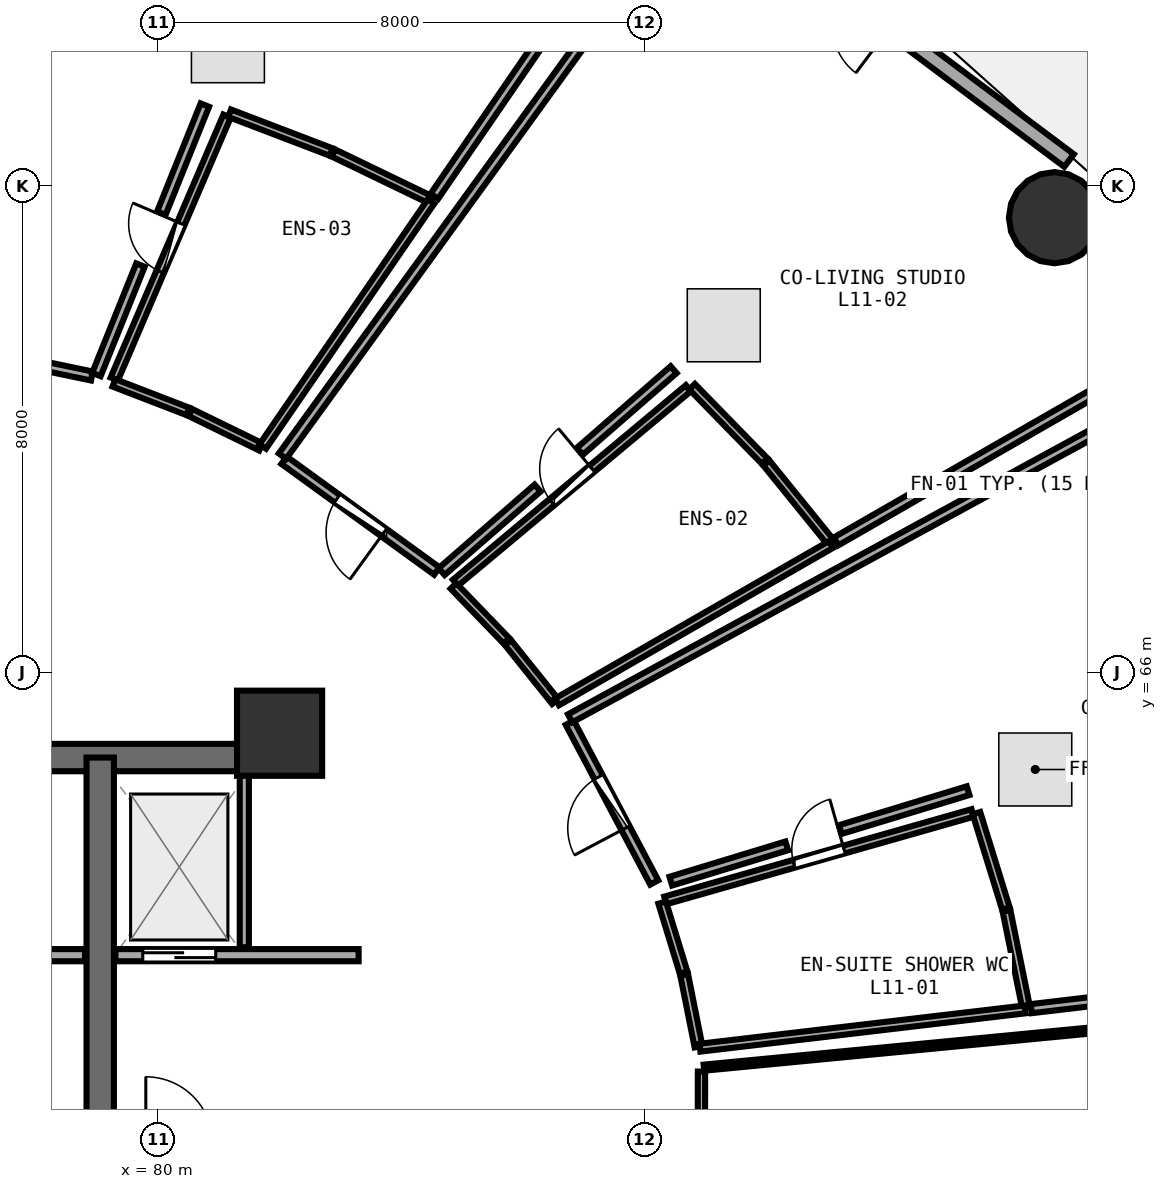
"""IFC4 building model, lengths in metres.
Left out: names, types, materials, properties, quantities, classifications, styles, units other than length and angle.
Written with IfcOpenShell. Run it as: python <this file> out.ifc"""

import sys

from ifc_helpers import new_model, si_unit, direction, frame, frame_2d, origin, origin_2d, place, context, subcontext, project, spatial, rectangle, circle, extrude, element, fill, save


model = new_model("IFC4")
c1 = context("Model", 3, precision=1e-05, world=origin(), true_north=direction((0.0, 1.0)))
c2 = subcontext(c1, "Body", "Model", "MODEL_VIEW")
j1 = project(units=[si_unit("LENGTHUNIT", "METRE"), si_unit("PLANEANGLEUNIT", "RADIAN")], contexts=[c1])
p1 = place(None, origin())
s1 = spatial("IfcSite", under=j1, at=p1, CompositionType="ELEMENT")
p2 = place(p1, origin())
s2 = spatial("IfcBuilding", under=s1, at=p2, CompositionType="ELEMENT")
p3 = place(p2, frame((0.0, 0.0, 45.0)))
s3 = spatial("IfcBuildingStorey", under=s2, at=p3, CompositionType="ELEMENT", Elevation=45.0)
p4 = place(p3, frame((82.0, 65.0, 0.0), z_axis=(0.0, 0.0, 1.0), x_axis=(1.0, 0.0, 0.0)))
e1 = element("IfcColumn", 1, at=p4, inside=s3, PredefinedType="PILASTER", context=c2, shape_type="SweptSolid", body=[
    extrude(rectangle(XDim=1.4, YDim=1.4, at=origin_2d()), origin(), (0.0, 0.0, 1.0), 3.75),
])
p5 = place(p3, frame((94.744, 73.478, 0.0), z_axis=(0.0, 0.0, 1.0), x_axis=(1.0, 0.0, 0.0)))
e2 = element("IfcColumn", 2, at=p5, inside=s3, PredefinedType="COLUMN", context=c2, shape_type="SweptSolid", body=[
    extrude(circle(Radius=0.75, at=origin_2d()), origin(), (0.0, 0.0, 1.0), 3.75),
])
p6 = place(p3, frame((94.984, 74.418, 0.0), z_axis=(0.0, 0.0, 1.0), x_axis=(-0.80030733173, 0.599590005569, 0.0)))
e3 = element("IfcWall", 3, at=p6, inside=s3, PredefinedType="SOLIDWALL", context=c2, shape_type="SweptSolid", body=[
    extrude(rectangle(XDim=8.291, YDim=0.26, at=frame_2d((4.145, 0.0))), origin(), (0.0, 0.0, 1.0), 3.475),
])
p7 = place(p6, frame((3.67, 0.0, 0.0)))
e4 = element("IfcOpeningElement", 4, at=p7, cuts=e3, PredefinedType="OPENING", context=c2, shape_type="SweptSolid", body=[
    extrude(rectangle(XDim=0.95, YDim=2.1, at=frame_2d((0.475, 1.05))), frame((0.0, 0.14, 0.0), z_axis=(0.0, -1.0, 0.0), x_axis=(1.0, 0.0, 0.0)), (0.0, 0.0, 1.0), 0.28),
])
p8 = place(p6, frame((4.97, 0.0, 0.85)))
e5 = element("IfcOpeningElement", 5, at=p8, cuts=e3, PredefinedType="OPENING", context=c2, shape_type="SweptSolid", body=[
    extrude(rectangle(XDim=1.2, YDim=1.45, at=frame_2d((0.6, 0.725))), frame((0.0, 0.14, 0.0), z_axis=(0.0, -1.0, 0.0), x_axis=(1.0, 0.0, 0.0)), (0.0, 0.0, 1.0), 0.28),
])
p9 = place(p3, frame((74.0, 64.6, 0.0), z_axis=(0.0, 0.0, 1.0), x_axis=(1.0, 0.0, 0.0)))
e6 = element("IfcWall", 6, at=p9, inside=s3, PredefinedType="SHEAR", context=c2, shape_type="SweptSolid", body=[
    extrude(rectangle(XDim=8.0, YDim=0.45, at=frame_2d((4.0, 0.0))), origin(), (0.0, 0.0, 1.0), 3.49),
])
p10 = place(p3, frame((79.05, 58.3, 0.0), z_axis=(0.0, 0.0, 1.0), x_axis=(0.0, 1.0, 0.0)))
e7 = element("IfcWall", 7, at=p10, inside=s3, PredefinedType="SHEAR", context=c2, shape_type="SweptSolid", body=[
    extrude(rectangle(XDim=6.3, YDim=0.45, at=frame_2d((3.15, 0.0))), origin(), (0.0, 0.0, 1.0), 3.49),
])
p11 = place(p3, frame((74.2, 61.35, 0.0), z_axis=(0.0, 0.0, 1.0), x_axis=(1.0, 0.0, 0.0)))
e8 = element("IfcWall", 8, at=p11, inside=s3, PredefinedType="SOLIDWALL", context=c2, shape_type="SweptSolid", body=[
    extrude(rectangle(XDim=4.6, YDim=0.2, at=frame_2d((2.3, 0.0))), origin(), (0.0, 0.0, 1.0), 3.48),
])
p12 = place(p11, frame((0.52, 0.0, 0.0)))
e9 = element("IfcOpeningElement", 9, at=p12, cuts=e8, PredefinedType="OPENING", context=c2, shape_type="SweptSolid", body=[
    extrude(rectangle(XDim=1.2, YDim=2.15, at=frame_2d((0.6, 1.075))), frame((0.0, 0.11, 0.0), z_axis=(0.0, -1.0, 0.0), x_axis=(1.0, 0.0, 0.0)), (0.0, 0.0, 1.0), 0.22),
])
p13 = place(p3, frame((79.3, 61.35, 0.0), z_axis=(0.0, 0.0, 1.0), x_axis=(1.0, 0.0, 0.0)))
e10 = element("IfcWall", 10, at=p13, inside=s3, PredefinedType="SOLIDWALL", context=c2, shape_type="SweptSolid", body=[
    extrude(rectangle(XDim=4.0, YDim=0.2, at=frame_2d((2.0, 0.0))), origin(), (0.0, 0.0, 1.0), 2.775),
])
p14 = place(p13, frame((0.45, 0.0, 0.0)))
e11 = element("IfcOpeningElement", 11, at=p14, cuts=e10, PredefinedType="OPENING", context=c2, shape_type="SweptSolid", body=[
    extrude(rectangle(XDim=1.2, YDim=2.15, at=frame_2d((0.6, 1.075))), frame((0.0, 0.11, 0.0), z_axis=(0.0, -1.0, 0.0), x_axis=(1.0, 0.0, 0.0)), (0.0, 0.0, 1.0), 0.22),
])
p15 = place(p3, frame((81.42, 61.48, 0.0), z_axis=(0.0, 0.0, 1.0), x_axis=(0.0, 1.0, 0.0)))
e12 = element("IfcWall", 12, at=p15, inside=s3, PredefinedType="PARTITIONING", context=c2, shape_type="SweptSolid", body=[
    extrude(rectangle(XDim=2.84, YDim=0.15, at=frame_2d((1.42, 0.0))), origin(), (0.0, 0.0, 1.0), 3.48),
])
p16 = place(p3, frame((88.344, 62.25, 0.0), z_axis=(0.0, 0.0, 1.0), x_axis=(0.961805744602, 0.273732916636, 0.0)))
e13 = element("IfcWall", 13, at=p16, inside=s3, PredefinedType="PLUMBINGWALL", context=c2, shape_type="SweptSolid", body=[
    extrude(rectangle(XDim=5.254, YDim=0.13, at=frame_2d((2.627, 0.0))), origin(), (0.0, 0.0, 1.0), 3.175),
])
p17 = place(p16, frame((2.197, 0.0, 0.0)))
e14 = element("IfcOpeningElement", 14, at=p17, cuts=e13, PredefinedType="OPENING", context=c2, shape_type="SweptSolid", body=[
    extrude(rectangle(XDim=0.86, YDim=2.05, at=frame_2d((0.43, 1.025))), frame((0.0, 0.075, 0.0), z_axis=(0.0, -1.0, 0.0), x_axis=(1.0, 0.0, 0.0)), (0.0, 0.0, 1.0), 0.15),
])
p18 = place(p3, frame((88.162, 62.546, 0.0), z_axis=(0.0, 0.0, 1.0), x_axis=(-0.467566881753, 0.883957697567, 0.0)))
e15 = element("IfcWall", 15, at=p18, inside=s3, PredefinedType="PARTITIONING", context=c2, shape_type="SweptSolid", body=[
    extrude(rectangle(XDim=2.972, YDim=0.15, at=frame_2d((1.486, 0.0))), origin(), (0.0, 0.0, 1.0), 2.875),
])
p19 = place(p18, frame((1.011, 0.0, 0.0)))
e16 = element("IfcOpeningElement", 16, at=p19, cuts=e15, PredefinedType="OPENING", context=c2, shape_type="SweptSolid", body=[
    extrude(rectangle(XDim=0.95, YDim=2.08, at=frame_2d((0.475, 1.04))), frame((0.0, 0.085, 0.0), z_axis=(0.0, -1.0, 0.0), x_axis=(1.0, 0.0, 0.0)), (0.0, 0.0, 1.0), 0.17),
])
p20 = place(p3, frame((84.892, 67.475, 0.0), z_axis=(0.0, 0.0, 1.0), x_axis=(0.767551433238, 0.64098736129, 0.0)))
e17 = element("IfcWall", 17, at=p20, inside=s3, PredefinedType="PLUMBINGWALL", context=c2, shape_type="SweptSolid", body=[
    extrude(rectangle(XDim=4.992, YDim=0.13, at=frame_2d((2.496, 0.0))), origin(), (0.0, 0.0, 1.0), 3.175),
])
p21 = place(p20, frame((2.066, 0.0, 0.0)))
e18 = element("IfcOpeningElement", 18, at=p21, cuts=e17, PredefinedType="OPENING", context=c2, shape_type="SweptSolid", body=[
    extrude(rectangle(XDim=0.86, YDim=2.05, at=frame_2d((0.43, 1.025))), frame((0.0, 0.075, 0.0), z_axis=(0.0, -1.0, 0.0), x_axis=(1.0, 0.0, 0.0)), (0.0, 0.0, 1.0), 0.15),
])
p22 = place(p3, frame((84.586, 67.667, 0.0), z_axis=(0.0, 0.0, 1.0), x_axis=(-0.80951419377, 0.587100306664, 0.0)))
e19 = element("IfcWall", 19, at=p22, inside=s3, PredefinedType="PARTITIONING", context=c2, shape_type="SweptSolid", body=[
    extrude(rectangle(XDim=3.104, YDim=0.15, at=frame_2d((1.552, 0.0))), origin(), (0.0, 0.0, 1.0), 2.875),
])
p23 = place(p22, frame((1.077, 0.0, 0.0)))
e20 = element("IfcOpeningElement", 20, at=p23, cuts=e19, PredefinedType="OPENING", context=c2, shape_type="SweptSolid", body=[
    extrude(rectangle(XDim=0.95, YDim=2.08, at=frame_2d((0.475, 1.04))), frame((0.0, 0.085, 0.0), z_axis=(0.0, -1.0, 0.0), x_axis=(1.0, 0.0, 0.0)), (0.0, 0.0, 1.0), 0.17),
])
p24 = place(p3, frame((79.281, 70.824, 0.0), z_axis=(0.0, 0.0, 1.0), x_axis=(0.394194788946, 0.919026913843, 0.0)))
e21 = element("IfcWall", 21, at=p24, inside=s3, PredefinedType="PLUMBINGWALL", context=c2, shape_type="SweptSolid", body=[
    extrude(rectangle(XDim=4.706, YDim=0.13, at=frame_2d((2.353, 0.0))), origin(), (0.0, 0.0, 1.0), 2.875),
])
p25 = place(p24, frame((1.923, 0.0, 0.0)))
e22 = element("IfcOpeningElement", 22, at=p25, cuts=e21, PredefinedType="OPENING", context=c2, shape_type="SweptSolid", body=[
    extrude(rectangle(XDim=0.86, YDim=2.05, at=frame_2d((0.43, 1.025))), frame((0.0, 0.075, 0.0), z_axis=(0.0, -1.0, 0.0), x_axis=(1.0, 0.0, 0.0)), (0.0, 0.0, 1.0), 0.15),
])
p26 = place(p3, frame((78.914, 70.874, 0.0), z_axis=(0.0, 0.0, 1.0), x_axis=(-0.978952544969, 0.204088007237, 0.0)))
e23 = element("IfcWall", 23, at=p26, inside=s3, PredefinedType="PARTITIONING", context=c2, shape_type="SweptSolid", body=[
    extrude(rectangle(XDim=3.207, YDim=0.15, at=frame_2d((1.604, 0.0))), origin(), (0.0, 0.0, 1.0), 3.235),
])
p27 = place(p26, frame((1.129, 0.0, 0.0)))
e24 = element("IfcOpeningElement", 24, at=p27, cuts=e23, PredefinedType="OPENING", context=c2, shape_type="SweptSolid", body=[
    extrude(rectangle(XDim=0.95, YDim=2.08, at=frame_2d((0.475, 1.04))), frame((0.0, 0.085, 0.0), z_axis=(0.0, -1.0, 0.0), x_axis=(1.0, 0.0, 0.0)), (0.0, 0.0, 1.0), 0.17),
])
p28 = place(p3, frame((88.934, 56.522, 0.0), z_axis=(0.0, 0.0, 1.0), x_axis=(0.001675600865, 0.99999859618, 0.0)))
e25 = element("IfcWall", 25, at=p28, inside=s3, PredefinedType="PARTITIONING", context=c2, shape_type="SweptSolid", body=[
    extrude(rectangle(XDim=2.914, YDim=0.12, at=frame_2d((1.457, 0.0))), origin(), (0.0, 0.0, 1.0), 2.875),
])
p29 = place(p28, frame((1.007, 0.0, 0.0)))
e26 = element("IfcOpeningElement", 26, at=p29, cuts=e25, PredefinedType="OPENING", context=c2, shape_type="SweptSolid", body=[
    extrude(rectangle(XDim=0.9, YDim=2.08, at=frame_2d((0.45, 1.04))), frame((0.0, 0.07, 0.0), z_axis=(0.0, -1.0, 0.0), x_axis=(1.0, 0.0, 0.0)), (0.0, 0.0, 1.0), 0.14),
])
p30 = place(p3, frame((88.89, 59.846, 0.0), z_axis=(0.0, 0.0, 1.0), x_axis=(-0.195959765133, 0.980611936726, 0.0)))
e27 = element("IfcWall", 27, at=p30, inside=s3, PredefinedType="PLUMBINGWALL", context=c2, shape_type="SweptSolid", body=[
    extrude(rectangle(XDim=1.201, YDim=0.13, at=frame_2d((0.601, 0.0))), origin(), (0.0, 0.0, 1.0), 3.48),
])
p31 = place(p3, frame((88.645, 61.062, 0.0), z_axis=(0.0, 0.0, 1.0), x_axis=(-0.292804953119, 0.956172191307, 0.0)))
e28 = element("IfcWall", 28, at=p31, inside=s3, PredefinedType="PLUMBINGWALL", context=c2, shape_type="SweptSolid", body=[
    extrude(rectangle(XDim=1.206, YDim=0.13, at=frame_2d((0.603, 0.0))), origin(), (0.0, 0.0, 1.0), 3.48),
])
p32 = place(p3, frame((93.461, 63.686, 0.0), z_axis=(0.0, 0.0, 1.0), x_axis=(0.295079059694, -0.955472840289, 0.0)))
e29 = element("IfcWall", 29, at=p32, inside=s3, PredefinedType="PLUMBINGWALL", context=c2, shape_type="SweptSolid", body=[
    extrude(rectangle(XDim=1.641, YDim=0.13, at=frame_2d((0.82, 0.0))), origin(), (0.0, 0.0, 1.0), 3.48),
])
p33 = place(p3, frame((93.955, 62.079, 0.0), z_axis=(0.0, 0.0, 1.0), x_axis=(0.198619685617, -0.980076640108, 0.0)))
e30 = element("IfcWall", 30, at=p33, inside=s3, PredefinedType="PLUMBINGWALL", context=c2, shape_type="SweptSolid", body=[
    extrude(rectangle(XDim=1.631, YDim=0.13, at=frame_2d((0.815, 0.0))), origin(), (0.0, 0.0, 1.0), 3.48),
])
p34 = place(p3, frame((94.263, 60.459, 0.0), z_axis=(0.0, 0.0, 1.0), x_axis=(-0.993128310231, -0.117030591804, 0.0)))
e31 = element("IfcWall", 31, at=p34, inside=s3, PredefinedType="PLUMBINGWALL", context=c2, shape_type="SweptSolid", body=[
    extrude(rectangle(XDim=5.386, YDim=0.13, at=frame_2d((2.693, 0.0))), origin(), (0.0, 0.0, 1.0), 3.175),
])
p35 = place(p3, frame((86.779, 65.245, 0.0), z_axis=(0.0, 0.0, 1.0), x_axis=(0.878114235828, 0.478451030761, 0.0)))
e32 = element("IfcWall", 32, at=p35, inside=s3, PredefinedType="PARTITIONING", context=c2, shape_type="SweptSolid", body=[
    extrude(rectangle(XDim=11.942, YDim=0.15, at=frame_2d((5.971, 0.0))), origin(), (0.0, 0.0, 1.0), 2.875),
])
p36 = place(p3, frame((101.192, 61.275, 0.0), z_axis=(0.0, 0.0, 1.0), x_axis=(-0.993130233211, -0.117014272133, 0.0)))
e33 = element("IfcWall", 33, at=p36, inside=s3, PredefinedType="PARTITIONING", context=c2, shape_type="SweptSolid", body=[
    extrude(rectangle(XDim=6.877, YDim=0.15, at=frame_2d((3.438, 0.0))), origin(), (0.0, 0.0, 1.0), 2.875),
])
p37 = place(p3, frame((93.324, 64.055, 0.0), z_axis=(0.0, 0.0, 1.0), x_axis=(-0.956656385618, -0.291219092533, 0.0)))
e34 = element("IfcWall", 34, at=p37, inside=s3, PredefinedType="PARTITIONING", context=c2, shape_type="SweptSolid", body=[
    extrude(rectangle(XDim=2.197, YDim=0.15, at=frame_2d((1.099, 0.0))), origin(), (0.0, 0.0, 1.0), 3.175),
])
p38 = place(p3, frame((90.341, 63.148, 0.0), z_axis=(0.0, 0.0, 1.0), x_axis=(-0.956672396934, -0.291166490078, 0.0)))
e35 = element("IfcWall", 35, at=p38, inside=s3, PredefinedType="PARTITIONING", context=c2, shape_type="SweptSolid", body=[
    extrude(rectangle(XDim=1.993, YDim=0.15, at=frame_2d((0.997, 0.0))), origin(), (0.0, 0.0, 1.0), 3.235),
])
p39 = place(p3, frame((86.533, 65.521, 0.0), z_axis=(0.0, 0.0, 1.0), x_axis=(-0.625509784914, 0.780216321912, 0.0)))
e36 = element("IfcWall", 36, at=p39, inside=s3, PredefinedType="PLUMBINGWALL", context=c2, shape_type="SweptSolid", body=[
    extrude(rectangle(XDim=1.242, YDim=0.13, at=frame_2d((0.621, 0.0))), origin(), (0.0, 0.0, 1.0), 2.875),
])
p40 = place(p3, frame((85.73, 66.521, 0.0), z_axis=(0.0, 0.0, 1.0), x_axis=(-0.694622338853, 0.719374593913, 0.0)))
e37 = element("IfcWall", 37, at=p40, inside=s3, PredefinedType="PLUMBINGWALL", context=c2, shape_type="SweptSolid", body=[
    extrude(rectangle(XDim=1.253, YDim=0.13, at=frame_2d((0.626, 0.0))), origin(), (0.0, 0.0, 1.0), 2.875),
])
p41 = place(p3, frame((88.784, 70.699, 0.0), z_axis=(0.0, 0.0, 1.0), x_axis=(0.698493231478, -0.715616661055, 0.0)))
e38 = element("IfcWall", 38, at=p41, inside=s3, PredefinedType="PLUMBINGWALL", context=c2, shape_type="SweptSolid", body=[
    extrude(rectangle(XDim=1.711, YDim=0.13, at=frame_2d((0.855, 0.0))), origin(), (0.0, 0.0, 1.0), 2.875),
])
p42 = place(p3, frame((90.006, 69.445, 0.0), z_axis=(0.0, 0.0, 1.0), x_axis=(0.629707963092, -0.776831951723, 0.0)))
e39 = element("IfcWall", 39, at=p42, inside=s3, PredefinedType="PLUMBINGWALL", context=c2, shape_type="SweptSolid", body=[
    extrude(rectangle(XDim=1.694, YDim=0.13, at=frame_2d((0.847, 0.0))), origin(), (0.0, 0.0, 1.0), 3.175),
])
p43 = place(p3, frame((91.068, 68.103, 0.0), z_axis=(0.0, 0.0, 1.0), x_axis=(-0.867165143158, -0.498020696851, 0.0)))
e40 = element("IfcWall", 40, at=p43, inside=s3, PredefinedType="PLUMBINGWALL", context=c2, shape_type="SweptSolid", body=[
    extrude(rectangle(XDim=5.194, YDim=0.13, at=frame_2d((2.597, 0.0))), origin(), (0.0, 0.0, 1.0), 2.875),
])
p44 = place(p3, frame((82.049, 69.557, 0.0), z_axis=(0.0, 0.0, 1.0), x_axis=(0.586718941426, 0.809790641939, 0.0)))
e41 = element("IfcWall", 41, at=p44, inside=s3, PredefinedType="PARTITIONING", context=c2, shape_type="SweptSolid", body=[
    extrude(rectangle(XDim=11.249, YDim=0.15, at=frame_2d((5.625, 0.0))), origin(), (0.0, 0.0, 1.0), 2.875),
])
p45 = place(p3, frame((96.903, 71.461, 0.0), z_axis=(0.0, 0.0, 1.0), x_axis=(-0.866924194656, -0.498440007142, 0.0)))
e42 = element("IfcWall", 42, at=p45, inside=s3, PredefinedType="PARTITIONING", context=c2, shape_type="SweptSolid", body=[
    extrude(rectangle(XDim=6.634, YDim=0.15, at=frame_2d((3.317, 0.0))), origin(), (0.0, 0.0, 1.0), 2.875),
])
p46 = place(p3, frame((88.481, 70.979, 0.0), z_axis=(0.0, 0.0, 1.0), x_axis=(-0.754356172394, -0.656465357176, 0.0)))
e43 = element("IfcWall", 43, at=p46, inside=s3, PredefinedType="PARTITIONING", context=c2, shape_type="SweptSolid", body=[
    extrude(rectangle(XDim=2.045, YDim=0.15, at=frame_2d((1.022, 0.0))), origin(), (0.0, 0.0, 1.0), 3.175),
])
p47 = place(p3, frame((86.244, 69.032, 0.0), z_axis=(0.0, 0.0, 1.0), x_axis=(-0.754351792987, -0.656470389597, 0.0)))
e44 = element("IfcWall", 44, at=p47, inside=s3, PredefinedType="PARTITIONING", context=c2, shape_type="SweptSolid", body=[
    extrude(rectangle(XDim=2.093, YDim=0.15, at=frame_2d((1.046, 0.0))), origin(), (0.0, 0.0, 1.0), 3.235),
])
p48 = place(p3, frame((81.694, 69.708, 0.0), z_axis=(0.0, 0.0, 1.0), x_axis=(-0.898753964496, 0.43845331713, 0.0)))
e45 = element("IfcWall", 45, at=p48, inside=s3, PredefinedType="PLUMBINGWALL", context=c2, shape_type="SweptSolid", body=[
    extrude(rectangle(XDim=1.296, YDim=0.13, at=frame_2d((0.648, 0.0))), origin(), (0.0, 0.0, 1.0), 2.875),
])
p49 = place(p3, frame((80.492, 70.292, 0.0), z_axis=(0.0, 0.0, 1.0), x_axis=(-0.932939679843, 0.360032712089, 0.0)))
e46 = element("IfcWall", 46, at=p49, inside=s3, PredefinedType="PLUMBINGWALL", context=c2, shape_type="SweptSolid", body=[
    extrude(rectangle(XDim=1.304, YDim=0.13, at=frame_2d((0.652, 0.0))), origin(), (0.0, 0.0, 1.0), 3.48),
])
p50 = place(p3, frame((81.178, 75.197, 0.0), z_axis=(0.0, 0.0, 1.0), x_axis=(0.934026387995, -0.357204012477, 0.0)))
e47 = element("IfcWall", 47, at=p50, inside=s3, PredefinedType="PLUMBINGWALL", context=c2, shape_type="SweptSolid", body=[
    extrude(rectangle(XDim=1.789, YDim=0.13, at=frame_2d((0.894, 0.0))), origin(), (0.0, 0.0, 1.0), 3.48),
])
p51 = place(p3, frame((82.885, 74.542, 0.0), z_axis=(0.0, 0.0, 1.0), x_axis=(0.900637023717, -0.434572147648, 0.0)))
e48 = element("IfcWall", 48, at=p51, inside=s3, PredefinedType="PLUMBINGWALL", context=c2, shape_type="SweptSolid", body=[
    extrude(rectangle(XDim=1.775, YDim=0.13, at=frame_2d((0.888, 0.0))), origin(), (0.0, 0.0, 1.0), 3.48),
])
p52 = place(p3, frame((84.491, 73.746, 0.0), z_axis=(0.0, 0.0, 1.0), x_axis=(-0.566068810651, -0.824357993597, 0.0)))
e49 = element("IfcWall", 49, at=p52, inside=s3, PredefinedType="PLUMBINGWALL", context=c2, shape_type="SweptSolid", body=[
    extrude(rectangle(XDim=4.889, YDim=0.13, at=frame_2d((2.444, 0.0))), origin(), (0.0, 0.0, 1.0), 3.175),
])
p53 = place(p3, frame((87.463, 78.083, 0.0), z_axis=(0.0, 0.0, 1.0), x_axis=(-0.565642433627, -0.824650615279, 0.0)))
e50 = element("IfcWall", 50, at=p53, inside=s3, PredefinedType="PARTITIONING", context=c2, shape_type="SweptSolid", body=[
    extrude(rectangle(XDim=5.157, YDim=0.15, at=frame_2d((2.579, 0.0))), origin(), (0.0, 0.0, 1.0), 2.875),
])
p54 = place(p3, frame((80.771, 75.33, 0.0), z_axis=(0.0, 0.0, 1.0), x_axis=(-0.373257508911, -0.927727779061, 0.0)))
e51 = element("IfcWall", 51, at=p54, inside=s3, PredefinedType="PARTITIONING", context=c2, shape_type="SweptSolid", body=[
    extrude(rectangle(XDim=1.916, YDim=0.15, at=frame_2d((0.958, 0.0))), origin(), (0.0, 0.0, 1.0), 2.875),
])
p55 = place(p3, frame((79.712, 72.699, 0.0), z_axis=(0.0, 0.0, 1.0), x_axis=(-0.373407797427, -0.927667298562, 0.0)))
e52 = element("IfcWall", 52, at=p55, inside=s3, PredefinedType="PARTITIONING", context=c2, shape_type="SweptSolid", body=[
    extrude(rectangle(XDim=1.94, YDim=0.15, at=frame_2d((0.97, 0.0))), origin(), (0.0, 0.0, 1.0), 3.235),
])
p56 = place(p3, frame((88.979, 59.5, 0.0), z_axis=(0.0, 0.0, 1.0), x_axis=(0.995408087514, 0.095722198638, 0.0)))
e53 = element("IfcWall", 53, at=p56, inside=s3, PredefinedType="PARTITIONING", context=c2, shape_type="SweptSolid", body=[
    extrude(rectangle(XDim=12.352, YDim=0.1, at=frame_2d((6.176, 0.0))), origin(), (0.0, 0.0, 1.0), 2.875),
])
p57 = place(p14, origin())
e54 = element("IfcDoor", 54, at=p57, inside=s3, OperationType="DOUBLE_DOOR_SLIDING", PredefinedType="DOOR", context=c2, shape_type="SweptSolid", body=[
    extrude(rectangle(XDim=1.2, YDim=2.15, at=frame_2d((0.6, 1.075))), frame((0.0, 0.025, 0.0), z_axis=(0.0, -1.0, 0.0), x_axis=(1.0, 0.0, 0.0)), (0.0, 0.0, 1.0), 0.05),
])
fill(e11, e54)
p58 = place(p17, origin())
e55 = element("IfcDoor", 55, at=p58, inside=s3, OperationType="SINGLE_SWING_RIGHT", PredefinedType="DOOR", context=c2, shape_type="SweptSolid", body=[
    extrude(rectangle(XDim=0.86, YDim=2.05, at=frame_2d((0.43, 1.025))), frame((0.0, 0.025, 0.0), z_axis=(0.0, -1.0, 0.0), x_axis=(1.0, 0.0, 0.0)), (0.0, 0.0, 1.0), 0.05),
])
fill(e14, e55)
p59 = place(p19, origin())
e56 = element("IfcDoor", 56, at=p59, inside=s3, OperationType="SINGLE_SWING_LEFT", PredefinedType="DOOR", context=c2, shape_type="SweptSolid", body=[
    extrude(rectangle(XDim=0.95, YDim=2.08, at=frame_2d((0.475, 1.04))), frame((0.0, 0.025, 0.0), z_axis=(0.0, -1.0, 0.0), x_axis=(1.0, 0.0, 0.0)), (0.0, 0.0, 1.0), 0.05),
])
fill(e16, e56)
p60 = place(p21, origin())
e57 = element("IfcDoor", 57, at=p60, inside=s3, OperationType="SINGLE_SWING_RIGHT", PredefinedType="DOOR", context=c2, shape_type="SweptSolid", body=[
    extrude(rectangle(XDim=0.86, YDim=2.05, at=frame_2d((0.43, 1.025))), frame((0.0, 0.025, 0.0), z_axis=(0.0, -1.0, 0.0), x_axis=(1.0, 0.0, 0.0)), (0.0, 0.0, 1.0), 0.05),
])
fill(e18, e57)
p61 = place(p23, origin())
e58 = element("IfcDoor", 58, at=p61, inside=s3, OperationType="SINGLE_SWING_LEFT", PredefinedType="DOOR", context=c2, shape_type="SweptSolid", body=[
    extrude(rectangle(XDim=0.95, YDim=2.08, at=frame_2d((0.475, 1.04))), frame((0.0, 0.025, 0.0), z_axis=(0.0, -1.0, 0.0), x_axis=(1.0, 0.0, 0.0)), (0.0, 0.0, 1.0), 0.05),
])
fill(e20, e58)
p62 = place(p25, origin())
e59 = element("IfcDoor", 59, at=p62, inside=s3, OperationType="SINGLE_SWING_RIGHT", PredefinedType="DOOR", context=c2, shape_type="SweptSolid", body=[
    extrude(rectangle(XDim=0.86, YDim=2.05, at=frame_2d((0.43, 1.025))), frame((0.0, 0.025, 0.0), z_axis=(0.0, -1.0, 0.0), x_axis=(1.0, 0.0, 0.0)), (0.0, 0.0, 1.0), 0.05),
])
fill(e22, e59)
save(model, sys.argv[1])
